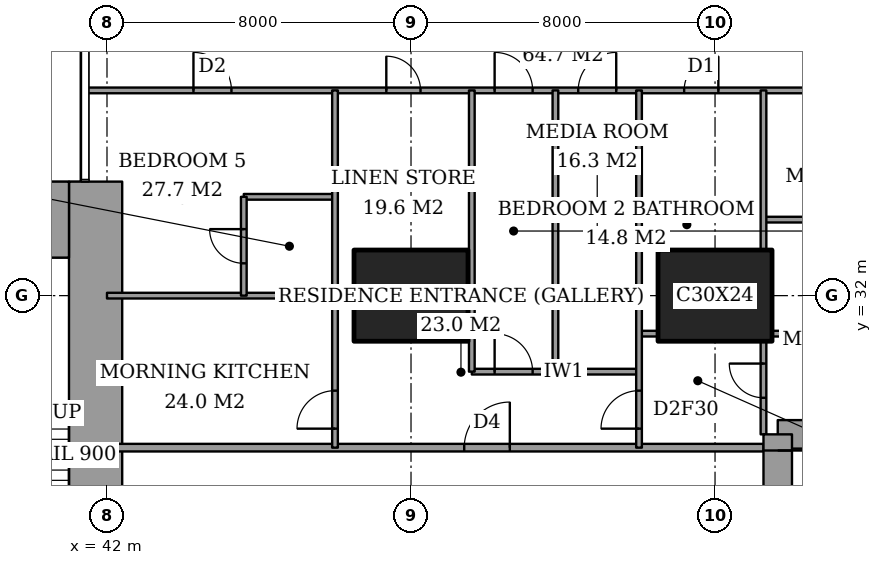
"""IFC4 building model, lengths in metres.
Left out: names, types, materials, properties, quantities, classifications, styles, units other than length and angle.
Written with IfcOpenShell. Run it as: python <this file> out.ifc"""

import sys

from ifc_helpers import new_model, si_unit, direction, frame, frame_2d, origin, origin_2d, place, context, subcontext, project, spatial, rectangle, extrude, element, fill, save


model = new_model("IFC4")
c1 = context("Model", 3, precision=1e-05, world=origin(), true_north=direction((0.0, 1.0)))
c2 = subcontext(c1, "Body", "Model", "MODEL_VIEW")
j1 = project(units=[si_unit("LENGTHUNIT", "METRE"), si_unit("PLANEANGLEUNIT", "RADIAN")], contexts=[c1])
p1 = place(None, origin())
s1 = spatial("IfcSite", under=j1, at=p1, CompositionType="ELEMENT")
p2 = place(p1, origin())
s2 = spatial("IfcBuilding", under=s1, at=p2, CompositionType="ELEMENT")
p3 = place(p2, frame((0.0, 0.0, 221.8)))
s3 = spatial("IfcBuildingStorey", under=s2, at=p3, CompositionType="ELEMENT", Elevation=221.8)
for number, where, z_axis, x_axis in (
    (1, (50.0, 32.0, 0.0), (0.0, 0.0, 1.0), (1.0, 0.0, 0.0)),
    (2, (58.0, 32.0, 0.0), (0.0, 0.0, 1.0), (1.0, 0.0, 0.0)),
):
    element("IfcColumn", number, at=place(p3, frame(where, z_axis=z_axis, x_axis=x_axis)), inside=s3, PredefinedType="COLUMN", context=c2, shape_type="SweptSolid", body=[
        extrude(rectangle(XDim=3.0, YDim=2.4, at=origin_2d()), origin(), (0.0, 0.0, 1.0), 3.6),
    ])
p4 = place(p3, frame((37.85, 34.0, 0.0), z_axis=(0.0, 0.0, 1.0), x_axis=(1.0, 0.0, 0.0)))
e3 = element("IfcWall", 3, at=p4, inside=s3, PredefinedType="SHEAR", context=c2, shape_type="SweptSolid", body=[
    extrude(rectangle(XDim=3.15, YDim=2.0, at=frame_2d((1.575, 0.0))), origin(), (0.0, 0.0, 1.0), 3.6),
])
p5 = place(p3, frame((41.7, 24.85, 0.0), z_axis=(0.0, 0.0, 1.0), x_axis=(0.0, 1.0, 0.0)))
e4 = element("IfcWall", 4, at=p5, inside=s3, PredefinedType="SHEAR", context=c2, shape_type="SweptSolid", body=[
    extrude(rectangle(XDim=10.15, YDim=1.4, at=frame_2d((5.075, 0.0))), origin(), (0.0, 0.0, 1.0), 3.6),
])
p6 = place(p3, frame((64.1, 28.35, 0.0), z_axis=(0.0, 0.0, 1.0), x_axis=(-1.0, 0.0, 0.0)))
e5 = element("IfcWall", 5, at=p6, inside=s3, PredefinedType="SHEAR", context=c2, shape_type="SweptSolid", body=[
    extrude(rectangle(XDim=4.45, YDim=0.75, at=frame_2d((2.225, 0.0))), origin(), (0.0, 0.0, 1.0), 3.6),
])
p7 = place(p3, frame((59.65, 28.35, 0.0), z_axis=(0.0, 0.0, 1.0), x_axis=(0.0, -1.0, 0.0)))
e6 = element("IfcWall", 6, at=p7, inside=s3, PredefinedType="SHEAR", context=c2, shape_type="SweptSolid", body=[
    extrude(rectangle(XDim=8.7, YDim=0.75, at=frame_2d((4.35, 0.0))), origin(), (0.0, 0.0, 1.0), 3.6),
])
p8 = place(p7, frame((0.425, 0.0, 0.0)))
e7 = element("IfcOpeningElement", 7, at=p8, cuts=e6, PredefinedType="OPENING", context=c2, shape_type="SweptSolid", body=[
    extrude(rectangle(XDim=1.6, YDim=2.1, at=frame_2d((0.8, 1.05))), frame((0.0, 0.385, 0.0), z_axis=(0.0, -1.0, 0.0), x_axis=(1.0, 0.0, 0.0)), (0.0, 0.0, 1.0), 0.77),
])
p9 = place(p3, frame((42.0, 28.0, 0.0), z_axis=(0.0, 0.0, 1.0), x_axis=(1.0, 0.0, 0.0)))
e8 = element("IfcWall", 8, at=p9, inside=s3, PredefinedType="PARTITIONING", context=c2, shape_type="SweptSolid", body=[
    extrude(rectangle(XDim=17.275, YDim=0.2, at=frame_2d((8.637, 0.0))), origin(), (0.0, 0.0, 1.0), 3.25),
])
p10 = place(p9, frame((9.4, 0.0, 0.0)))
e9 = element("IfcOpeningElement", 9, at=p10, cuts=e8, PredefinedType="OPENING", context=c2, shape_type="SweptSolid", body=[
    extrude(rectangle(XDim=1.2, YDim=2.4, at=frame_2d((0.6, 1.2))), frame((0.0, 0.11, 0.0), z_axis=(0.0, -1.0, 0.0), x_axis=(1.0, 0.0, 0.0)), (0.0, 0.0, 1.0), 0.22),
])
p11 = place(p3, frame((51.6, 30.0, 0.0), z_axis=(0.0, 0.0, 1.0), x_axis=(1.0, 0.0, 0.0)))
e10 = element("IfcWall", 10, at=p11, inside=s3, PredefinedType="PARTITIONING", context=c2, shape_type="SweptSolid", body=[
    extrude(rectangle(XDim=4.4, YDim=0.15, at=frame_2d((2.2, 0.0))), origin(), (0.0, 0.0, 1.0), 3.25),
])
p12 = place(p11, frame((0.6, 0.0, 0.0)))
e11 = element("IfcOpeningElement", 11, at=p12, cuts=e10, PredefinedType="OPENING", context=c2, shape_type="SweptSolid", body=[
    extrude(rectangle(XDim=1.0, YDim=2.1, at=frame_2d((0.5, 1.05))), frame((0.0, 0.085, 0.0), z_axis=(0.0, -1.0, 0.0), x_axis=(1.0, 0.0, 0.0)), (0.0, 0.0, 1.0), 0.17),
])
p13 = place(p3, frame((56.0, 31.0, 0.0), z_axis=(0.0, 0.0, 1.0), x_axis=(1.0, 0.0, 0.0)))
e12 = element("IfcWall", 12, at=p13, inside=s3, PredefinedType="PARTITIONING", context=c2, shape_type="SweptSolid", body=[
    extrude(rectangle(XDim=0.5, YDim=0.15, at=frame_2d((0.25, 0.0))), origin(), (0.0, 0.0, 1.0), 3.25),
])
p14 = place(p3, frame((59.5, 31.0, 0.0), z_axis=(0.0, 0.0, 1.0), x_axis=(1.0, 0.0, 0.0)))
e13 = element("IfcWall", 13, at=p14, inside=s3, PredefinedType="PARTITIONING", context=c2, shape_type="SweptSolid", body=[
    extrude(rectangle(XDim=6.95, YDim=0.15, at=frame_2d((3.475, 0.0))), origin(), (0.0, 0.0, 1.0), 3.25),
])
p15 = place(p3, frame((48.0, 31.95, 0.0), z_axis=(0.0, 0.0, 1.0), x_axis=(1.0, 0.0, 0.0)))
e14 = element("IfcWall", 14, at=p15, inside=s3, PredefinedType="PARTITIONING", context=c2, shape_type="SweptSolid", body=[
    extrude(rectangle(XDim=0.5, YDim=0.15, at=frame_2d((0.25, 0.0))), origin(), (0.0, 0.0, 1.0), 3.25),
])
p16 = place(p3, frame((42.0, 32.0, 0.0), z_axis=(0.0, 0.0, 1.0), x_axis=(1.0, 0.0, 0.0)))
e15 = element("IfcWall", 15, at=p16, inside=s3, PredefinedType="PARTITIONING", context=c2, shape_type="SweptSolid", body=[
    extrude(rectangle(XDim=6.0, YDim=0.15, at=frame_2d((3.0, 0.0))), origin(), (0.0, 0.0, 1.0), 3.25),
])
p17 = place(p3, frame((59.275, 34.0, 0.0), z_axis=(0.0, 0.0, 1.0), x_axis=(1.0, 0.0, 0.0)))
e16 = element("IfcWall", 16, at=p17, inside=s3, PredefinedType="PARTITIONING", context=c2, shape_type="SweptSolid", body=[
    extrude(rectangle(XDim=2.6, YDim=0.15, at=frame_2d((1.3, 0.0))), origin(), (0.0, 0.0, 1.0), 3.25),
])
p18 = place(p3, frame((45.6, 34.6, 0.0), z_axis=(0.0, 0.0, 1.0), x_axis=(1.0, 0.0, 0.0)))
e17 = element("IfcWall", 17, at=p18, inside=s3, PredefinedType="PARTITIONING", context=c2, shape_type="SweptSolid", body=[
    extrude(rectangle(XDim=2.4, YDim=0.15, at=frame_2d((1.2, 0.0))), origin(), (0.0, 0.0, 1.0), 3.25),
])
p19 = place(p3, frame((41.439, 37.4, 0.0), z_axis=(0.0, 0.0, 1.0), x_axis=(1.0, 0.0, 0.0)))
e18 = element("IfcWall", 18, at=p19, inside=s3, PredefinedType="PARTITIONING", context=c2, shape_type="SweptSolid", body=[
    extrude(rectangle(XDim=25.011, YDim=0.15, at=frame_2d((12.505, 0.0))), origin(), (0.0, 0.0, 1.0), 3.25),
])
p20 = place(p19, frame((10.761, 0.0, 0.0)))
e19 = element("IfcOpeningElement", 19, at=p20, cuts=e18, PredefinedType="OPENING", context=c2, shape_type="SweptSolid", body=[
    extrude(rectangle(XDim=1.0, YDim=2.1, at=frame_2d((0.5, 1.05))), frame((0.0, 0.085, 0.0), z_axis=(0.0, -1.0, 0.0), x_axis=(1.0, 0.0, 0.0)), (0.0, 0.0, 1.0), 0.17),
])
p21 = place(p19, frame((20.924, 0.0, 0.0)))
e20 = element("IfcOpeningElement", 20, at=p21, cuts=e18, PredefinedType="OPENING", context=c2, shape_type="SweptSolid", body=[
    extrude(rectangle(XDim=1.0, YDim=2.1, at=frame_2d((0.5, 1.05))), frame((0.0, 0.085, 0.0), z_axis=(0.0, -1.0, 0.0), x_axis=(1.0, 0.0, 0.0)), (0.0, 0.0, 1.0), 0.17),
])
p22 = place(p19, frame((15.749, 0.0, 0.0)))
e21 = element("IfcOpeningElement", 21, at=p22, cuts=e18, PredefinedType="OPENING", context=c2, shape_type="SweptSolid", body=[
    extrude(rectangle(XDim=0.9, YDim=2.1, at=frame_2d((0.45, 1.05))), frame((0.0, 0.085, 0.0), z_axis=(0.0, -1.0, 0.0), x_axis=(1.0, 0.0, 0.0)), (0.0, 0.0, 1.0), 0.17),
])
p23 = place(p19, frame((12.961, 0.0, 0.0)))
e22 = element("IfcOpeningElement", 22, at=p23, cuts=e18, PredefinedType="OPENING", context=c2, shape_type="SweptSolid", body=[
    extrude(rectangle(XDim=1.0, YDim=2.1, at=frame_2d((0.5, 1.05))), frame((0.0, 0.085, 0.0), z_axis=(0.0, -1.0, 0.0), x_axis=(1.0, 0.0, 0.0)), (0.0, 0.0, 1.0), 0.17),
])
p24 = place(p19, frame((7.911, 0.0, 0.0)))
e23 = element("IfcOpeningElement", 23, at=p24, cuts=e18, PredefinedType="OPENING", context=c2, shape_type="SweptSolid", body=[
    extrude(rectangle(XDim=0.9, YDim=2.1, at=frame_2d((0.45, 1.05))), frame((0.0, 0.085, 0.0), z_axis=(0.0, -1.0, 0.0), x_axis=(1.0, 0.0, 0.0)), (0.0, 0.0, 1.0), 0.17),
])
p25 = place(p19, frame((2.836, 0.0, 0.0)))
e24 = element("IfcOpeningElement", 24, at=p25, cuts=e18, PredefinedType="OPENING", context=c2, shape_type="SweptSolid", body=[
    extrude(rectangle(XDim=1.0, YDim=2.1, at=frame_2d((0.5, 1.05))), frame((0.0, 0.085, 0.0), z_axis=(0.0, -1.0, 0.0), x_axis=(1.0, 0.0, 0.0)), (0.0, 0.0, 1.0), 0.17),
])
p26 = place(p3, frame((45.6, 32.0, 0.0), z_axis=(0.0, 0.0, 1.0), x_axis=(0.0, 1.0, 0.0)))
e25 = element("IfcWall", 25, at=p26, inside=s3, PredefinedType="PARTITIONING", context=c2, shape_type="SweptSolid", body=[
    extrude(rectangle(XDim=2.6, YDim=0.15, at=frame_2d((1.3, 0.0))), origin(), (0.0, 0.0, 1.0), 3.25),
])
p27 = place(p26, frame((0.85, 0.0, 0.0)))
e26 = element("IfcOpeningElement", 26, at=p27, cuts=e25, PredefinedType="OPENING", context=c2, shape_type="SweptSolid", body=[
    extrude(rectangle(XDim=0.9, YDim=2.1, at=frame_2d((0.45, 1.05))), frame((0.0, 0.085, 0.0), z_axis=(0.0, -1.0, 0.0), x_axis=(1.0, 0.0, 0.0)), (0.0, 0.0, 1.0), 0.17),
])
p28 = place(p3, frame((48.0, 28.0, 0.0), z_axis=(0.0, 0.0, 1.0), x_axis=(0.0, 1.0, 0.0)))
e27 = element("IfcWall", 27, at=p28, inside=s3, PredefinedType="PARTITIONING", context=c2, shape_type="SweptSolid", body=[
    extrude(rectangle(XDim=9.4, YDim=0.15, at=frame_2d((4.7, 0.0))), origin(), (0.0, 0.0, 1.0), 3.25),
])
p29 = place(p28, frame((0.5, 0.0, 0.0)))
e28 = element("IfcOpeningElement", 28, at=p29, cuts=e27, PredefinedType="OPENING", context=c2, shape_type="SweptSolid", body=[
    extrude(rectangle(XDim=1.0, YDim=2.1, at=frame_2d((0.5, 1.05))), frame((0.0, 0.085, 0.0), z_axis=(0.0, -1.0, 0.0), x_axis=(1.0, 0.0, 0.0)), (0.0, 0.0, 1.0), 0.17),
])
for number, where, z_axis, x_axis in (
    (29, (51.6, 30.0, 0.0), (0.0, 0.0, 1.0), (0.0, 1.0, 0.0)),
    (30, (53.8, 30.0, 0.0), (0.0, 0.0, 1.0), (0.0, 1.0, 0.0)),
):
    element("IfcWall", number, at=place(p3, frame(where, z_axis=z_axis, x_axis=x_axis)), inside=s3, PredefinedType="PARTITIONING", context=c2, shape_type="SweptSolid", body=[
        extrude(rectangle(XDim=7.4, YDim=0.15, at=frame_2d((3.7, 0.0))), origin(), (0.0, 0.0, 1.0), 3.25),
    ])
p30 = place(p3, frame((56.0, 28.0, 0.0), z_axis=(0.0, 0.0, 1.0), x_axis=(0.0, 1.0, 0.0)))
e31 = element("IfcWall", 31, at=p30, inside=s3, PredefinedType="PARTITIONING", context=c2, shape_type="SweptSolid", body=[
    extrude(rectangle(XDim=9.4, YDim=0.15, at=frame_2d((4.7, 0.0))), origin(), (0.0, 0.0, 1.0), 3.25),
])
p31 = place(p30, frame((0.5, 0.0, 0.0)))
e32 = element("IfcOpeningElement", 32, at=p31, cuts=e31, PredefinedType="OPENING", context=c2, shape_type="SweptSolid", body=[
    extrude(rectangle(XDim=1.0, YDim=2.1, at=frame_2d((0.5, 1.05))), frame((0.0, 0.085, 0.0), z_axis=(0.0, -1.0, 0.0), x_axis=(1.0, 0.0, 0.0)), (0.0, 0.0, 1.0), 0.17),
])
p32 = place(p3, frame((59.275, 28.35, 0.0), z_axis=(0.0, 0.0, 1.0), x_axis=(0.0, 1.0, 0.0)))
e33 = element("IfcWall", 33, at=p32, inside=s3, PredefinedType="PARTITIONING", context=c2, shape_type="SweptSolid", body=[
    extrude(rectangle(XDim=2.45, YDim=0.15, at=frame_2d((1.225, 0.0))), origin(), (0.0, 0.0, 1.0), 3.25),
])
p33 = place(p32, frame((0.962, 0.0, 0.0)))
e34 = element("IfcOpeningElement", 34, at=p33, cuts=e33, PredefinedType="OPENING", context=c2, shape_type="SweptSolid", body=[
    extrude(rectangle(XDim=0.9, YDim=2.1, at=frame_2d((0.45, 1.05))), frame((0.0, 0.085, 0.0), z_axis=(0.0, -1.0, 0.0), x_axis=(1.0, 0.0, 0.0)), (0.0, 0.0, 1.0), 0.17),
])
p34 = place(p3, frame((59.275, 33.2, 0.0), z_axis=(0.0, 0.0, 1.0), x_axis=(0.0, 1.0, 0.0)))
e35 = element("IfcWall", 35, at=p34, inside=s3, PredefinedType="PARTITIONING", context=c2, shape_type="SweptSolid", body=[
    extrude(rectangle(XDim=4.2, YDim=0.15, at=frame_2d((2.1, 0.0))), origin(), (0.0, 0.0, 1.0), 3.25),
])
p35 = place(p20, origin())
e36 = element("IfcDoor", 36, at=p35, inside=s3, OperationType="SINGLE_SWING_RIGHT", PredefinedType="DOOR", context=c2, shape_type="SweptSolid", body=[
    extrude(rectangle(XDim=1.0, YDim=2.1, at=frame_2d((0.5, 1.05))), frame((0.0, 0.025, 0.0), z_axis=(0.0, -1.0, 0.0), x_axis=(1.0, 0.0, 0.0)), (0.0, 0.0, 1.0), 0.05),
])
fill(e19, e36)
p36 = place(p33, origin())
e37 = element("IfcDoor", 37, at=p36, inside=s3, OperationType="SINGLE_SWING_LEFT", PredefinedType="DOOR", context=c2, shape_type="SweptSolid", body=[
    extrude(rectangle(XDim=0.9, YDim=2.1, at=frame_2d((0.45, 1.05))), frame((0.0, 0.025, 0.0), z_axis=(0.0, -1.0, 0.0), x_axis=(1.0, 0.0, 0.0)), (0.0, 0.0, 1.0), 0.05),
])
fill(e34, e37)
p37 = place(p22, origin())
e38 = element("IfcDoor", 38, at=p37, inside=s3, OperationType="SINGLE_SWING_LEFT", PredefinedType="DOOR", context=c2, shape_type="SweptSolid", body=[
    extrude(rectangle(XDim=0.9, YDim=2.1, at=frame_2d((0.45, 1.05))), frame((0.0, 0.025, 0.0), z_axis=(0.0, -1.0, 0.0), x_axis=(1.0, 0.0, 0.0)), (0.0, 0.0, 1.0), 0.05),
])
fill(e21, e38)
p38 = place(p31, origin())
e39 = element("IfcDoor", 39, at=p38, inside=s3, OperationType="SINGLE_SWING_RIGHT", PredefinedType="DOOR", context=c2, shape_type="SweptSolid", body=[
    extrude(rectangle(XDim=1.0, YDim=2.1, at=frame_2d((0.5, 1.05))), frame((0.0, 0.025, 0.0), z_axis=(0.0, -1.0, 0.0), x_axis=(1.0, 0.0, 0.0)), (0.0, 0.0, 1.0), 0.05),
])
fill(e32, e39)
p39 = place(p10, origin())
e40 = element("IfcDoor", 40, at=p39, inside=s3, OperationType="SINGLE_SWING_LEFT", PredefinedType="DOOR", context=c2, shape_type="SweptSolid", body=[
    extrude(rectangle(XDim=1.2, YDim=2.4, at=frame_2d((0.6, 1.2))), frame((0.0, 0.025, 0.0), z_axis=(0.0, -1.0, 0.0), x_axis=(1.0, 0.0, 0.0)), (0.0, 0.0, 1.0), 0.05),
])
fill(e9, e40)
p40 = place(p23, origin())
e41 = element("IfcDoor", 41, at=p40, inside=s3, OperationType="SINGLE_SWING_LEFT", PredefinedType="DOOR", context=c2, shape_type="SweptSolid", body=[
    extrude(rectangle(XDim=1.0, YDim=2.1, at=frame_2d((0.5, 1.05))), frame((0.0, 0.025, 0.0), z_axis=(0.0, -1.0, 0.0), x_axis=(1.0, 0.0, 0.0)), (0.0, 0.0, 1.0), 0.05),
])
fill(e22, e41)
p41 = place(p12, origin())
e42 = element("IfcDoor", 42, at=p41, inside=s3, OperationType="SINGLE_SWING_RIGHT", PredefinedType="DOOR", context=c2, shape_type="SweptSolid", body=[
    extrude(rectangle(XDim=1.0, YDim=2.1, at=frame_2d((0.5, 1.05))), frame((0.0, 0.025, 0.0), z_axis=(0.0, -1.0, 0.0), x_axis=(1.0, 0.0, 0.0)), (0.0, 0.0, 1.0), 0.05),
])
fill(e11, e42)
p42 = place(p24, origin())
e43 = element("IfcDoor", 43, at=p42, inside=s3, OperationType="SINGLE_SWING_RIGHT", PredefinedType="DOOR", context=c2, shape_type="SweptSolid", body=[
    extrude(rectangle(XDim=0.9, YDim=2.1, at=frame_2d((0.45, 1.05))), frame((0.0, 0.025, 0.0), z_axis=(0.0, -1.0, 0.0), x_axis=(1.0, 0.0, 0.0)), (0.0, 0.0, 1.0), 0.05),
])
fill(e23, e43)
p43 = place(p27, origin())
e44 = element("IfcDoor", 44, at=p43, inside=s3, OperationType="SINGLE_SWING_LEFT", PredefinedType="DOOR", context=c2, shape_type="SweptSolid", body=[
    extrude(rectangle(XDim=0.9, YDim=2.1, at=frame_2d((0.45, 1.05))), frame((0.0, 0.025, 0.0), z_axis=(0.0, -1.0, 0.0), x_axis=(1.0, 0.0, 0.0)), (0.0, 0.0, 1.0), 0.05),
])
fill(e26, e44)
p44 = place(p25, origin())
e45 = element("IfcDoor", 45, at=p44, inside=s3, OperationType="SINGLE_SWING_RIGHT", PredefinedType="DOOR", context=c2, shape_type="SweptSolid", body=[
    extrude(rectangle(XDim=1.0, YDim=2.1, at=frame_2d((0.5, 1.05))), frame((0.0, 0.025, 0.0), z_axis=(0.0, -1.0, 0.0), x_axis=(1.0, 0.0, 0.0)), (0.0, 0.0, 1.0), 0.05),
])
fill(e24, e45)
p45 = place(p29, origin())
e46 = element("IfcDoor", 46, at=p45, inside=s3, OperationType="SINGLE_SWING_RIGHT", PredefinedType="DOOR", context=c2, shape_type="SweptSolid", body=[
    extrude(rectangle(XDim=1.0, YDim=2.1, at=frame_2d((0.5, 1.05))), frame((0.0, 0.025, 0.0), z_axis=(0.0, -1.0, 0.0), x_axis=(1.0, 0.0, 0.0)), (0.0, 0.0, 1.0), 0.05),
])
fill(e28, e46)
p46 = place(p8, origin())
e47 = element("IfcDoor", 47, at=p46, inside=s3, OperationType="DOUBLE_DOOR_SINGLE_SWING", PredefinedType="DOOR", context=c2, shape_type="SweptSolid", body=[
    extrude(rectangle(XDim=1.6, YDim=2.1, at=frame_2d((0.8, 1.05))), frame((0.0, 0.025, 0.0), z_axis=(0.0, -1.0, 0.0), x_axis=(1.0, 0.0, 0.0)), (0.0, 0.0, 1.0), 0.05),
])
fill(e7, e47)
save(model, sys.argv[1])
